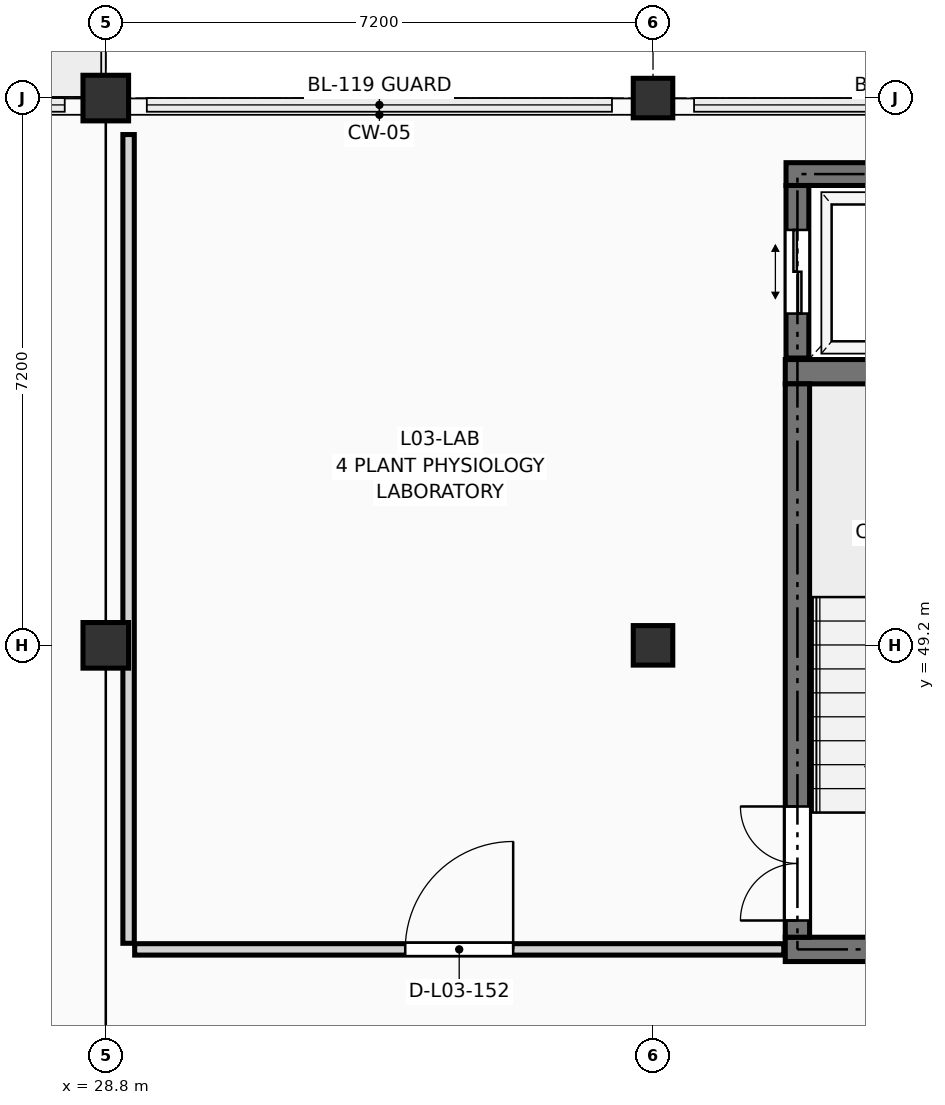
"""IFC4 building model, lengths in metres.
Left out: names, types, materials, properties, quantities, classifications, styles, units other than length and angle.
Written with IfcOpenShell. Run it as: python <this file> out.ifc"""

import sys

from ifc_helpers import new_model, si_unit, direction, frame, frame_2d, origin, origin_2d, place, context, subcontext, project, spatial, rectangle, extrude, element, fill, save


model = new_model("IFC4")
c1 = context("Model", 3, precision=1e-05, world=origin(), true_north=direction((0.0, 1.0)))
c2 = subcontext(c1, "Body", "Model", "MODEL_VIEW")
j1 = project(units=[si_unit("LENGTHUNIT", "METRE"), si_unit("PLANEANGLEUNIT", "RADIAN")], contexts=[c1])
p1 = place(None, origin())
s1 = spatial("IfcSite", under=j1, at=p1, CompositionType="ELEMENT")
p2 = place(p1, origin())
s2 = spatial("IfcBuilding", under=s1, at=p2, CompositionType="ELEMENT")
p3 = place(p2, frame((0.0, 0.0, 12.15)))
s3 = spatial("IfcBuildingStorey", under=s2, at=p3, CompositionType="ELEMENT", Elevation=12.15)
for number, where, z_axis, x_axis in (
    (1, (28.8, 49.2, 0.0), (0.0, 0.0, 1.0), (1.0, 0.0, 0.0)),
    (2, (28.8, 56.4, 0.0), (0.0, 0.0, 1.0), (1.0, 0.0, 0.0)),
):
    element("IfcColumn", number, at=place(p3, frame(where, z_axis=z_axis, x_axis=x_axis)), inside=s3, PredefinedType="COLUMN", context=c2, shape_type="SweptSolid", body=[
        extrude(rectangle(XDim=0.6, YDim=0.6, at=origin_2d()), origin(), (0.0, 0.0, 1.0), 3.6),
    ])
for number, where, z_axis, x_axis in (
    (3, (36.0, 49.2, 0.0), (0.0, 0.0, 1.0), (1.0, 0.0, 0.0)),
    (4, (36.0, 56.4, 0.0), (0.0, 0.0, 1.0), (1.0, 0.0, 0.0)),
):
    element("IfcColumn", number, at=place(p3, frame(where, z_axis=z_axis, x_axis=x_axis)), inside=s3, PredefinedType="COLUMN", context=c2, shape_type="SweptSolid", body=[
        extrude(rectangle(XDim=0.52, YDim=0.52, at=origin_2d()), origin(), (0.0, 0.0, 1.0), 3.6),
    ])
for number, where, z_axis, x_axis in (
    (5, (37.74, 45.2, 0.0), (0.0, 0.0, 1.0), (1.0, 0.0, 0.0)),
    (6, (37.74, 52.8, 0.0), (0.0, 0.0, 1.0), (1.0, 0.0, 0.0)),
):
    element("IfcWall", number, at=place(p3, frame(where, z_axis=z_axis, x_axis=x_axis)), inside=s3, PredefinedType="SHEAR", context=c2, shape_type="SweptSolid", body=[
        extrude(rectangle(XDim=4.44, YDim=0.32, at=frame_2d((2.22, 0.0))), origin(), (0.0, 0.0, 1.0), 3.39),
    ])
p4 = place(p3, frame((37.9, 45.36, 0.0), z_axis=(0.0, 0.0, 1.0), x_axis=(0.0, 1.0, 0.0)))
e7 = element("IfcWall", 7, at=p4, inside=s3, PredefinedType="SHEAR", context=c2, shape_type="SweptSolid", body=[
    extrude(rectangle(XDim=7.28, YDim=0.32, at=frame_2d((3.64, 0.0))), origin(), (0.0, 0.0, 1.0), 3.39),
])
p5 = place(p4, frame((0.22, 0.0, 0.0)))
e8 = element("IfcOpeningElement", 8, at=p5, cuts=e7, PredefinedType="OPENING", context=c2, shape_type="SweptSolid", body=[
    extrude(rectangle(XDim=1.5, YDim=2.2, at=frame_2d((0.75, 1.1))), frame((0.0, 0.172, 0.0), z_axis=(0.0, -1.0, 0.0), x_axis=(1.0, 0.0, 0.0)), (0.0, 0.0, 1.0), 0.344),
])
p6 = place(p3, frame((37.75, 55.4, 0.0), z_axis=(0.0, 0.0, 1.0), x_axis=(1.0, 0.0, 0.0)))
e9 = element("IfcWall", 9, at=p6, inside=s3, PredefinedType="SHEAR", context=c2, shape_type="SweptSolid", body=[
    extrude(rectangle(XDim=2.7, YDim=0.3, at=frame_2d((1.35, 0.0))), origin(), (0.0, 0.0, 1.0), 3.39),
])
p7 = place(p3, frame((37.9, 52.98, 0.0), z_axis=(0.0, 0.0, 1.0), x_axis=(0.0, 1.0, 0.0)))
e10 = element("IfcWall", 10, at=p7, inside=s3, PredefinedType="SHEAR", context=c2, shape_type="SweptSolid", body=[
    extrude(rectangle(XDim=2.27, YDim=0.3, at=frame_2d((1.135, 0.0))), origin(), (0.0, 0.0, 1.0), 3.39),
])
p8 = place(p7, frame((0.585, 0.0, 0.0)))
e11 = element("IfcOpeningElement", 11, at=p8, cuts=e10, PredefinedType="OPENING", context=c2, shape_type="SweptSolid", body=[
    extrude(rectangle(XDim=1.1, YDim=2.2, at=frame_2d((0.55, 1.1))), frame((0.0, 0.162, 0.0), z_axis=(0.0, -1.0, 0.0), x_axis=(1.0, 0.0, 0.0)), (0.0, 0.0, 1.0), 0.324),
])
p9 = place(p3, frame((29.1, 45.28, 0.0), z_axis=(0.0, 0.0, 1.0), x_axis=(0.0, 1.0, 0.0)))
e12 = element("IfcWall", 12, at=p9, inside=s3, PredefinedType="PARTITIONING", context=c2, shape_type="SweptSolid", body=[
    extrude(rectangle(XDim=10.64, YDim=0.15, at=frame_2d((5.32, 0.0))), origin(), (0.0, 0.0, 1.0), 2.655),
])
p10 = place(p3, frame((29.18, 45.2, 0.0), z_axis=(0.0, 0.0, 1.0), x_axis=(1.0, 0.0, 0.0)))
e13 = element("IfcWall", 13, at=p10, inside=s3, PredefinedType="PARTITIONING", context=c2, shape_type="SweptSolid", body=[
    extrude(rectangle(XDim=8.54, YDim=0.15, at=frame_2d((4.27, 0.0))), origin(), (0.0, 0.0, 1.0), 3.375),
])
p11 = place(p10, frame((3.56, 0.0, 0.0)))
e14 = element("IfcOpeningElement", 14, at=p11, cuts=e13, PredefinedType="OPENING", context=c2, shape_type="SweptSolid", body=[
    extrude(rectangle(XDim=1.42, YDim=2.22, at=frame_2d((0.71, 1.11))), frame((0.0, 0.087, 0.0), z_axis=(0.0, -1.0, 0.0), x_axis=(1.0, 0.0, 0.0)), (0.0, 0.0, 1.0), 0.174),
])
p12 = place(p5, origin())
e15 = element("IfcDoor", 15, at=p12, inside=s3, OperationType="DOUBLE_DOOR_SINGLE_SWING", PredefinedType="DOOR", context=c2, shape_type="SweptSolid", body=[
    extrude(rectangle(XDim=1.5, YDim=2.2, at=frame_2d((0.75, 1.1))), frame((0.0, 0.025, 0.0), z_axis=(0.0, -1.0, 0.0), x_axis=(1.0, 0.0, 0.0)), (0.0, 0.0, 1.0), 0.05),
])
fill(e8, e15)
p13 = place(p8, origin())
e16 = element("IfcDoor", 16, at=p13, inside=s3, OperationType="DOUBLE_DOOR_SLIDING", PredefinedType="DOOR", context=c2, shape_type="SweptSolid", body=[
    extrude(rectangle(XDim=1.1, YDim=2.2, at=frame_2d((0.55, 1.1))), frame((0.0, 0.025, 0.0), z_axis=(0.0, -1.0, 0.0), x_axis=(1.0, 0.0, 0.0)), (0.0, 0.0, 1.0), 0.05),
])
fill(e11, e16)
p14 = place(p11, origin())
e17 = element("IfcDoor", 17, at=p14, inside=s3, OperationType="SINGLE_SWING_RIGHT", PredefinedType="DOOR", context=c2, shape_type="SweptSolid", body=[
    extrude(rectangle(XDim=1.42, YDim=2.22, at=frame_2d((0.71, 1.11))), frame((0.0, 0.025, 0.0), z_axis=(0.0, -1.0, 0.0), x_axis=(1.0, 0.0, 0.0)), (0.0, 0.0, 1.0), 0.05),
])
fill(e14, e17)
save(model, sys.argv[1])
